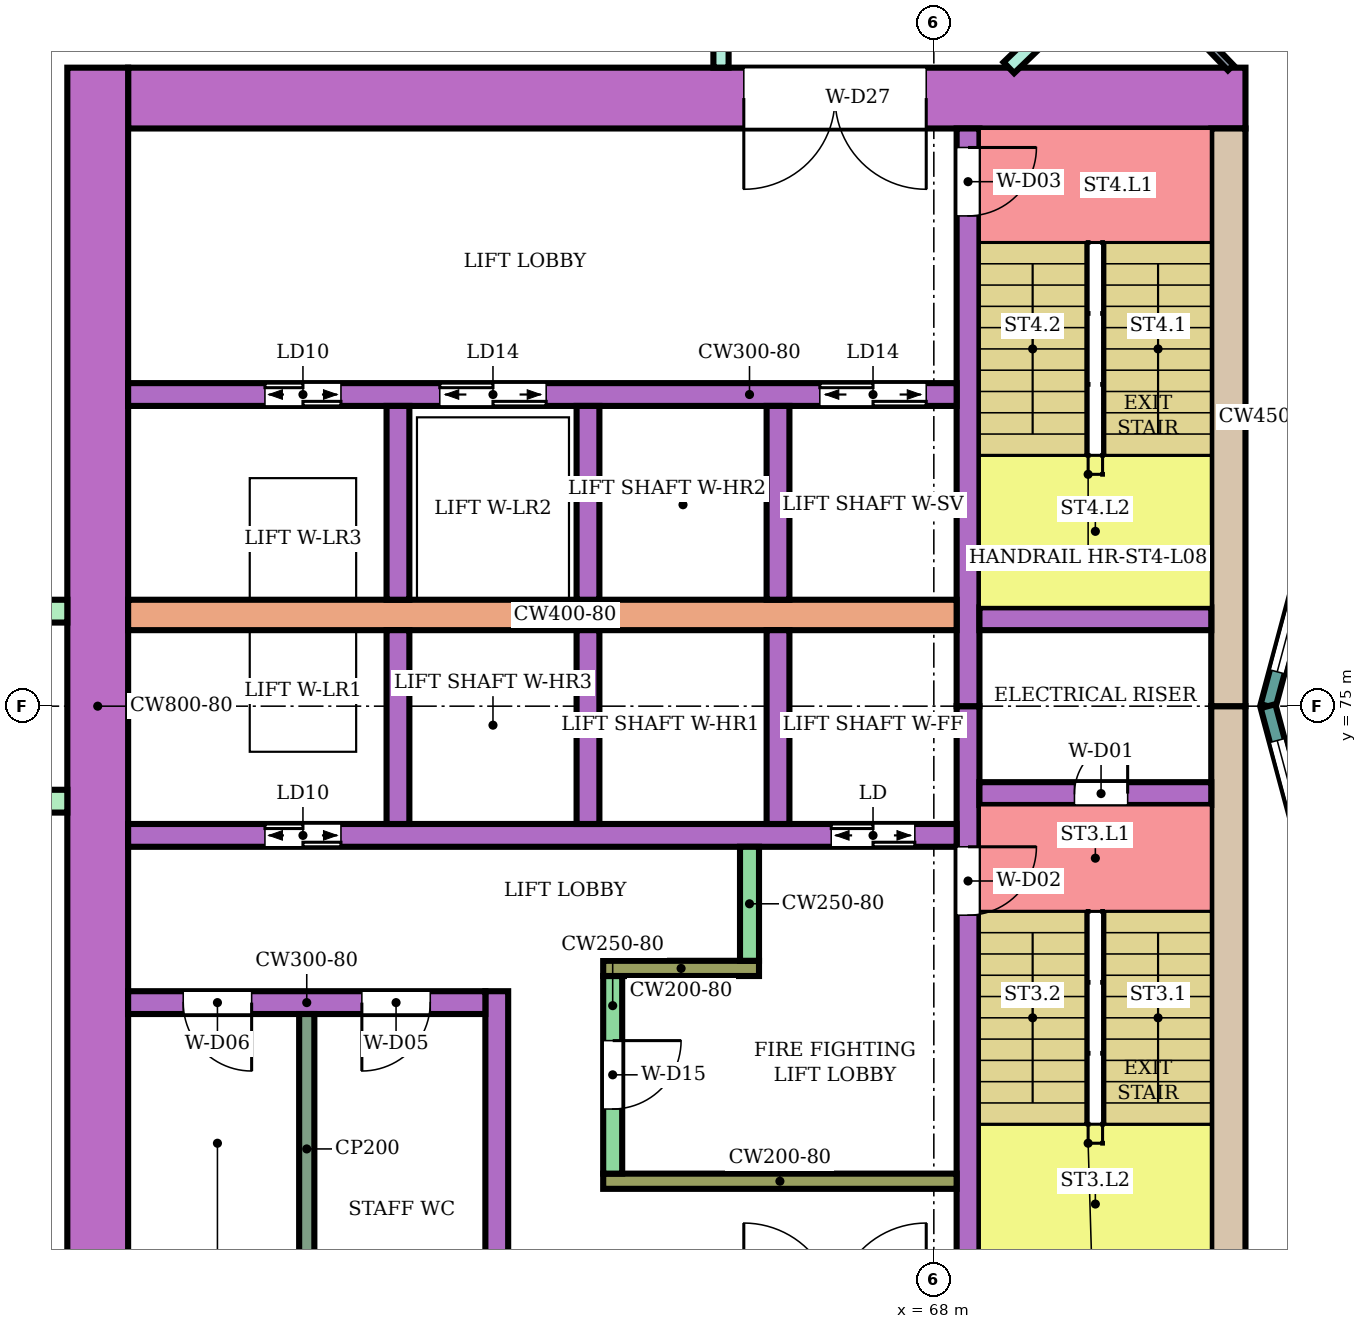
"""IFC4 building model, lengths in metres.
Left out: names, types, materials, properties, quantities, classifications, styles, units other than length and angle.
Written with IfcOpenShell. Run it as: python <this file> out.ifc"""

import sys

from ifc_helpers import new_model, si_unit, direction, frame, frame_2d, origin, place, context, subcontext, project, spatial, rectangle, extrude, element, fill, save


model = new_model("IFC4")
c1 = context("Model", 3, precision=1e-05, world=origin(), true_north=direction((0.0, 1.0)))
c2 = subcontext(c1, "Body", "Model", "MODEL_VIEW")
j1 = project(units=[si_unit("LENGTHUNIT", "METRE"), si_unit("PLANEANGLEUNIT", "RADIAN")], contexts=[c1])
p1 = place(None, origin())
s1 = spatial("IfcSite", under=j1, at=p1, CompositionType="ELEMENT")
p2 = place(p1, origin())
s2 = spatial("IfcBuilding", under=s1, at=p2, CompositionType="ELEMENT")
p3 = place(p2, frame((0.0, 0.0, 40.2)))
s3 = spatial("IfcBuildingStorey", under=s2, at=p3, CompositionType="ELEMENT", Elevation=40.2)
p4 = place(p3, frame((72.1, 83.0, 0.0), z_axis=(0.0, 0.0, 1.0), x_axis=(-1.0, 0.0, 0.0)))
e1 = element("IfcWall", 1, at=p4, inside=s3, PredefinedType="SHEAR", context=c2, shape_type="SweptSolid", body=[
    extrude(rectangle(XDim=14.7, YDim=0.8, at=frame_2d((7.35, 0.0))), origin(), (0.0, 0.0, 1.0), 3.48),
])
p5 = place(p4, frame((4.2, 0.0, 0.0)))
e2 = element("IfcOpeningElement", 2, at=p5, cuts=e1, PredefinedType="OPENING", context=c2, shape_type="SweptSolid", body=[
    extrude(rectangle(XDim=2.4, YDim=2.4, at=frame_2d((1.2, 1.2))), frame((0.0, 0.41, 0.0), z_axis=(0.0, -1.0, 0.0), x_axis=(1.0, 0.0, 0.0)), (0.0, 0.0, 1.0), 0.82),
])
for number, where, z_axis, x_axis in (
    (3, (71.875, 75.0, 0.0), (0.0, 0.0, 1.0), (0.0, -1.0, 0.0)),
    (4, (71.875, 82.6, 0.0), (0.0, 0.0, 1.0), (0.0, -1.0, 0.0)),
):
    element("IfcWall", number, at=place(p3, frame(where, z_axis=z_axis, x_axis=x_axis)), inside=s3, PredefinedType="SHEAR", context=c2, shape_type="SweptSolid", body=[
        extrude(rectangle(XDim=7.6, YDim=0.45, at=frame_2d((3.8, 0.0))), origin(), (0.0, 0.0, 1.0), 3.48),
    ])
p6 = place(p3, frame((57.0, 83.4, 0.0), z_axis=(0.0, 0.0, 1.0), x_axis=(0.0, -1.0, 0.0)))
e5 = element("IfcWall", 5, at=p6, inside=s3, PredefinedType="SHEAR", context=c2, shape_type="SweptSolid", body=[
    extrude(rectangle(XDim=16.8, YDim=0.8, at=frame_2d((8.4, 0.0))), origin(), (0.0, 0.0, 1.0), 3.48),
])
p7 = place(p3, frame((68.45, 75.0, 0.0), z_axis=(0.0, 0.0, 1.0), x_axis=(0.0, -1.0, 0.0)))
e6 = element("IfcWall", 6, at=p7, inside=s3, PredefinedType="SHEAR", context=c2, shape_type="SweptSolid", body=[
    extrude(rectangle(XDim=7.6, YDim=0.3, at=frame_2d((3.8, 0.0))), origin(), (0.0, 0.0, 1.0), 3.48),
])
p8 = place(p7, frame((1.85, 0.0, 0.0)))
e7 = element("IfcOpeningElement", 7, at=p8, cuts=e6, PredefinedType="OPENING", context=c2, shape_type="SweptSolid", body=[
    extrude(rectangle(XDim=0.9, YDim=2.1, at=frame_2d((0.45, 1.05))), frame((0.0, 0.16, 0.0), z_axis=(0.0, -1.0, 0.0), x_axis=(1.0, 0.0, 0.0)), (0.0, 0.0, 1.0), 0.32),
])
p9 = place(p3, frame((68.45, 82.6, 0.0), z_axis=(0.0, 0.0, 1.0), x_axis=(0.0, -1.0, 0.0)))
e8 = element("IfcWall", 8, at=p9, inside=s3, PredefinedType="SHEAR", context=c2, shape_type="SweptSolid", body=[
    extrude(rectangle(XDim=7.6, YDim=0.3, at=frame_2d((3.8, 0.0))), origin(), (0.0, 0.0, 1.0), 3.48),
])
p10 = place(p9, frame((0.25, 0.0, 0.0)))
e9 = element("IfcOpeningElement", 9, at=p10, cuts=e8, PredefinedType="OPENING", context=c2, shape_type="SweptSolid", body=[
    extrude(rectangle(XDim=0.9, YDim=2.1, at=frame_2d((0.45, 1.05))), frame((0.0, 0.16, 0.0), z_axis=(0.0, -1.0, 0.0), x_axis=(1.0, 0.0, 0.0)), (0.0, 0.0, 1.0), 0.32),
])
p11 = place(p3, frame((71.65, 73.85, 0.0), z_axis=(0.0, 0.0, 1.0), x_axis=(-1.0, 0.0, 0.0)))
e10 = element("IfcWall", 10, at=p11, inside=s3, PredefinedType="SHEAR", context=c2, shape_type="SweptSolid", body=[
    extrude(rectangle(XDim=3.05, YDim=0.3, at=frame_2d((1.525, 0.0))), origin(), (0.0, 0.0, 1.0), 3.48),
])
p12 = place(p11, frame((1.1, 0.0, 0.0)))
e11 = element("IfcOpeningElement", 11, at=p12, cuts=e10, PredefinedType="OPENING", context=c2, shape_type="SweptSolid", body=[
    extrude(rectangle(XDim=0.7, YDim=2.0, at=frame_2d((0.35, 1.0))), frame((0.0, 0.16, 0.0), z_axis=(0.0, -1.0, 0.0), x_axis=(1.0, 0.0, 0.0)), (0.0, 0.0, 1.0), 0.32),
])
p13 = place(p3, frame((71.65, 76.15, 0.0), z_axis=(0.0, 0.0, 1.0), x_axis=(-1.0, 0.0, 0.0)))
e12 = element("IfcWall", 12, at=p13, inside=s3, PredefinedType="SHEAR", context=c2, shape_type="SweptSolid", body=[
    extrude(rectangle(XDim=3.05, YDim=0.3, at=frame_2d((1.525, 0.0))), origin(), (0.0, 0.0, 1.0), 3.48),
])
p14 = place(p3, frame((68.3, 73.3, 0.0), z_axis=(0.0, 0.0, 1.0), x_axis=(-1.0, 0.0, 0.0)))
e13 = element("IfcWall", 13, at=p14, inside=s3, PredefinedType="SHEAR", context=c2, shape_type="SweptSolid", body=[
    extrude(rectangle(XDim=10.9, YDim=0.3, at=frame_2d((5.45, 0.0))), origin(), (0.0, 0.0, 1.0), 3.48),
])
p15 = place(p14, frame((0.55, 0.0, 0.0)))
e14 = element("IfcOpeningElement", 14, at=p15, cuts=e13, PredefinedType="OPENING", context=c2, shape_type="SweptSolid", body=[
    extrude(rectangle(XDim=1.1, YDim=2.1, at=frame_2d((0.55, 1.05))), frame((0.0, 0.16, 0.0), z_axis=(0.0, -1.0, 0.0), x_axis=(1.0, 0.0, 0.0)), (0.0, 0.0, 1.0), 0.32),
])
p16 = place(p14, frame((8.1, 0.0, 0.0)))
e15 = element("IfcOpeningElement", 15, at=p16, cuts=e13, PredefinedType="OPENING", context=c2, shape_type="SweptSolid", body=[
    extrude(rectangle(XDim=1.0, YDim=2.1, at=frame_2d((0.5, 1.05))), frame((0.0, 0.16, 0.0), z_axis=(0.0, -1.0, 0.0), x_axis=(1.0, 0.0, 0.0)), (0.0, 0.0, 1.0), 0.32),
])
p17 = place(p3, frame((68.3, 76.2, 0.0), z_axis=(0.0, 0.0, 1.0), x_axis=(-1.0, 0.0, 0.0)))
e16 = element("IfcWall", 16, at=p17, inside=s3, PredefinedType="SHEAR", context=c2, shape_type="SweptSolid", body=[
    extrude(rectangle(XDim=10.9, YDim=0.4, at=frame_2d((5.45, 0.0))), origin(), (0.0, 0.0, 1.0), 3.48),
])
p18 = place(p3, frame((68.3, 79.1, 0.0), z_axis=(0.0, 0.0, 1.0), x_axis=(-1.0, 0.0, 0.0)))
e17 = element("IfcWall", 17, at=p18, inside=s3, PredefinedType="SHEAR", context=c2, shape_type="SweptSolid", body=[
    extrude(rectangle(XDim=10.9, YDim=0.3, at=frame_2d((5.45, 0.0))), origin(), (0.0, 0.0, 1.0), 3.48),
])
p19 = place(p18, frame((0.4, 0.0, 0.0)))
e18 = element("IfcOpeningElement", 18, at=p19, cuts=e17, PredefinedType="OPENING", context=c2, shape_type="SweptSolid", body=[
    extrude(rectangle(XDim=1.4, YDim=2.1, at=frame_2d((0.7, 1.05))), frame((0.0, 0.16, 0.0), z_axis=(0.0, -1.0, 0.0), x_axis=(1.0, 0.0, 0.0)), (0.0, 0.0, 1.0), 0.32),
])
p20 = place(p18, frame((5.4, 0.0, 0.0)))
e19 = element("IfcOpeningElement", 19, at=p20, cuts=e17, PredefinedType="OPENING", context=c2, shape_type="SweptSolid", body=[
    extrude(rectangle(XDim=1.4, YDim=2.1, at=frame_2d((0.7, 1.05))), frame((0.0, 0.16, 0.0), z_axis=(0.0, -1.0, 0.0), x_axis=(1.0, 0.0, 0.0)), (0.0, 0.0, 1.0), 0.32),
])
p21 = place(p18, frame((8.1, 0.0, 0.0)))
e20 = element("IfcOpeningElement", 20, at=p21, cuts=e17, PredefinedType="OPENING", context=c2, shape_type="SweptSolid", body=[
    extrude(rectangle(XDim=1.0, YDim=2.1, at=frame_2d((0.5, 1.05))), frame((0.0, 0.16, 0.0), z_axis=(0.0, -1.0, 0.0), x_axis=(1.0, 0.0, 0.0)), (0.0, 0.0, 1.0), 0.32),
])
for number, where, z_axis, x_axis in (
    (21, (65.95, 76.0, 0.0), (0.0, 0.0, 1.0), (0.0, -1.0, 0.0)),
    (22, (63.45, 76.0, 0.0), (0.0, 0.0, 1.0), (0.0, -1.0, 0.0)),
    (23, (60.95, 76.0, 0.0), (0.0, 0.0, 1.0), (0.0, -1.0, 0.0)),
    (24, (65.95, 78.95, 0.0), (0.0, 0.0, 1.0), (0.0, -1.0, 0.0)),
    (25, (63.45, 78.95, 0.0), (0.0, 0.0, 1.0), (0.0, -1.0, 0.0)),
    (26, (60.95, 78.95, 0.0), (0.0, 0.0, 1.0), (0.0, -1.0, 0.0)),
):
    element("IfcWall", number, at=place(p3, frame(where, z_axis=z_axis, x_axis=x_axis)), inside=s3, PredefinedType="SHEAR", context=c2, shape_type="SweptSolid", body=[
        extrude(rectangle(XDim=2.55, YDim=0.3, at=frame_2d((1.275, 0.0))), origin(), (0.0, 0.0, 1.0), 3.48),
    ])
p22 = place(p3, frame((68.3, 68.75, 0.0), z_axis=(0.0, 0.0, 1.0), x_axis=(-1.0, 0.0, 0.0)))
e27 = element("IfcWall", 27, at=p22, inside=s3, PredefinedType="SHEAR", context=c2, shape_type="SweptSolid", body=[
    extrude(rectangle(XDim=4.65, YDim=0.2, at=frame_2d((2.325, 0.0))), origin(), (0.0, 0.0, 1.0), 3.48),
])
p23 = place(p3, frame((63.775, 71.45, 0.0), z_axis=(0.0, 0.0, 1.0), x_axis=(0.0, -1.0, 0.0)))
e28 = element("IfcWall", 28, at=p23, inside=s3, PredefinedType="SHEAR", context=c2, shape_type="SweptSolid", body=[
    extrude(rectangle(XDim=2.6, YDim=0.25, at=frame_2d((1.3, 0.0))), origin(), (0.0, 0.0, 1.0), 3.48),
])
p24 = place(p23, frame((0.85, 0.0, 0.0)))
e29 = element("IfcOpeningElement", 29, at=p24, cuts=e28, PredefinedType="OPENING", context=c2, shape_type="SweptSolid", body=[
    extrude(rectangle(XDim=0.9, YDim=2.1, at=frame_2d((0.45, 1.05))), frame((0.0, 0.135, 0.0), z_axis=(0.0, -1.0, 0.0), x_axis=(1.0, 0.0, 0.0)), (0.0, 0.0, 1.0), 0.27),
])
p25 = place(p3, frame((65.7, 71.55, 0.0), z_axis=(0.0, 0.0, 1.0), x_axis=(-1.0, 0.0, 0.0)))
e30 = element("IfcWall", 30, at=p25, inside=s3, PredefinedType="SHEAR", context=c2, shape_type="SweptSolid", body=[
    extrude(rectangle(XDim=2.05, YDim=0.2, at=frame_2d((1.025, 0.0))), origin(), (0.0, 0.0, 1.0), 3.48),
])
p26 = place(p3, frame((65.575, 73.15, 0.0), z_axis=(0.0, 0.0, 1.0), x_axis=(0.0, -1.0, 0.0)))
e31 = element("IfcWall", 31, at=p26, inside=s3, PredefinedType="SHEAR", context=c2, shape_type="SweptSolid", body=[
    extrude(rectangle(XDim=1.5, YDim=0.25, at=frame_2d((0.75, 0.0))), origin(), (0.0, 0.0, 1.0), 3.48),
])
p27 = place(p3, frame((62.25, 71.25, 0.0), z_axis=(0.0, 0.0, 1.0), x_axis=(0.0, -1.0, 0.0)))
e32 = element("IfcWall", 32, at=p27, inside=s3, PredefinedType="SHEAR", context=c2, shape_type="SweptSolid", body=[
    extrude(rectangle(XDim=3.85, YDim=0.3, at=frame_2d((1.925, 0.0))), origin(), (0.0, 0.0, 1.0), 3.48),
])
p28 = place(p3, frame((62.1, 71.1, 0.0), z_axis=(0.0, 0.0, 1.0), x_axis=(-1.0, 0.0, 0.0)))
e33 = element("IfcWall", 33, at=p28, inside=s3, PredefinedType="SHEAR", context=c2, shape_type="SweptSolid", body=[
    extrude(rectangle(XDim=4.7, YDim=0.3, at=frame_2d((2.35, 0.0))), origin(), (0.0, 0.0, 1.0), 3.48),
])
p29 = place(p28, frame((0.725, 0.0, 0.0)))
e34 = element("IfcOpeningElement", 34, at=p29, cuts=e33, PredefinedType="OPENING", context=c2, shape_type="SweptSolid", body=[
    extrude(rectangle(XDim=0.9, YDim=2.1, at=frame_2d((0.45, 1.05))), frame((0.0, 0.16, 0.0), z_axis=(0.0, -1.0, 0.0), x_axis=(1.0, 0.0, 0.0)), (0.0, 0.0, 1.0), 0.32),
])
p30 = place(p28, frame((3.075, 0.0, 0.0)))
e35 = element("IfcOpeningElement", 35, at=p30, cuts=e33, PredefinedType="OPENING", context=c2, shape_type="SweptSolid", body=[
    extrude(rectangle(XDim=0.9, YDim=2.1, at=frame_2d((0.45, 1.05))), frame((0.0, 0.16, 0.0), z_axis=(0.0, -1.0, 0.0), x_axis=(1.0, 0.0, 0.0)), (0.0, 0.0, 1.0), 0.32),
])
for number, where, z_axis, x_axis in (
    (36, (56.6, 76.25, 0.0), (0.0, 0.0, 1.0), (-1.0, 0.0, 0.0)),
    (37, (56.6, 73.75, 0.0), (0.0, 0.0, 1.0), (-1.0, 0.0, 0.0)),
):
    element("IfcWall", number, at=place(p3, frame(where, z_axis=z_axis, x_axis=x_axis)), inside=s3, PredefinedType="NOTDEFINED", context=c2, shape_type="SweptSolid", body=[
        extrude(rectangle(XDim=2.416, YDim=0.3, at=frame_2d((1.208, 0.0))), origin(), (0.0, 0.0, 1.0), 3.8),
    ])
p31 = place(p3, frame((73.415, 78.802, 0.0), z_axis=(0.0, 0.0, 1.0), x_axis=(-0.258789828301, -0.965933654434, 0.0)))
e38 = element("IfcWall", 38, at=p31, inside=s3, PredefinedType="NOTDEFINED", context=c2, shape_type="SweptSolid", body=[
    extrude(rectangle(XDim=3.936, YDim=0.2, at=frame_2d((1.968, 0.0))), origin(), (0.0, 0.0, 1.0), 3.8),
])
p32 = place(p31, frame((0.468, 0.0, 0.9)))
e39 = element("IfcOpeningElement", 39, at=p32, cuts=e38, PredefinedType="OPENING", context=c2, shape_type="SweptSolid", body=[
    extrude(rectangle(XDim=3.0, YDim=2.3, at=frame_2d((1.5, 1.15))), frame((0.0, 0.11, 0.0), z_axis=(0.0, -1.0, 0.0), x_axis=(1.0, 0.0, 0.0)), (0.0, 0.0, 1.0), 0.22),
])
p33 = place(p3, frame((72.396, 75.0, 0.0), z_axis=(0.0, 0.0, 1.0), x_axis=(0.258789828301, -0.965933654434, 0.0)))
e40 = element("IfcWall", 40, at=p33, inside=s3, PredefinedType="NOTDEFINED", context=c2, shape_type="SweptSolid", body=[
    extrude(rectangle(XDim=3.936, YDim=0.2, at=frame_2d((1.968, 0.0))), origin(), (0.0, 0.0, 1.0), 3.8),
])
p34 = place(p33, frame((0.468, 0.0, 0.9)))
e41 = element("IfcOpeningElement", 41, at=p34, cuts=e40, PredefinedType="OPENING", context=c2, shape_type="SweptSolid", body=[
    extrude(rectangle(XDim=3.0, YDim=2.3, at=frame_2d((1.5, 1.15))), frame((0.0, 0.11, 0.0), z_axis=(0.0, -1.0, 0.0), x_axis=(1.0, 0.0, 0.0)), (0.0, 0.0, 1.0), 0.22),
])
p35 = place(p3, frame((65.2, 83.401, 0.0), z_axis=(0.0, 0.0, 1.0), x_axis=(0.0, 1.0, 0.0)))
e42 = element("IfcWall", 42, at=p35, inside=s3, PredefinedType="PARTITIONING", context=c2, shape_type="SweptSolid", body=[
    extrude(rectangle(XDim=1.399, YDim=0.2, at=frame_2d((0.7, 0.0))), origin(), (0.0, 0.0, 1.0), 3.35),
])
p36 = place(p3, frame((68.987, 83.4, 0.0), z_axis=(0.0, 0.0, 1.0), x_axis=(0.719591503389, 0.694397629784, 0.0)))
e43 = element("IfcWall", 43, at=p36, inside=s3, PredefinedType="PARTITIONING", context=c2, shape_type="SweptSolid", body=[
    extrude(rectangle(XDim=5.378, YDim=0.2, at=frame_2d((2.689, 0.0))), origin(), (0.0, 0.0, 1.0), 3.35),
])
p37 = place(p36, frame((3.938, 0.0, 0.0)))
e44 = element("IfcOpeningElement", 44, at=p37, cuts=e43, PredefinedType="OPENING", context=c2, shape_type="SweptSolid", body=[
    extrude(rectangle(XDim=1.0, YDim=2.1, at=frame_2d((0.5, 1.05))), frame((0.0, 0.11, 0.0), z_axis=(0.0, -1.0, 0.0), x_axis=(1.0, 0.0, 0.0)), (0.0, 0.0, 1.0), 0.22),
])
p38 = place(p3, frame((70.567, 84.786, 0.0), z_axis=(0.0, 0.0, 1.0), x_axis=(0.694447472534, -0.719543402368, 0.0)))
e45 = element("IfcWall", 45, at=p38, inside=s3, PredefinedType="PARTITIONING", context=c2, shape_type="SweptSolid", body=[
    extrude(rectangle(XDim=1.926, YDim=0.1, at=frame_2d((0.963, 0.0))), origin(), (0.0, 0.0, 1.0), 3.35),
])
p39 = place(p38, frame((0.513, 0.0, 0.0)))
e46 = element("IfcOpeningElement", 46, at=p39, cuts=e45, PredefinedType="OPENING", context=c2, shape_type="SweptSolid", body=[
    extrude(rectangle(XDim=0.8, YDim=2.1, at=frame_2d((0.4, 1.05))), frame((0.0, 0.06, 0.0), z_axis=(0.0, -1.0, 0.0), x_axis=(1.0, 0.0, 0.0)), (0.0, 0.0, 1.0), 0.12),
])
p40 = place(p3, frame((59.75, 70.95, 0.0), z_axis=(0.0, 0.0, 1.0), x_axis=(0.0, -1.0, 0.0)))
e47 = element("IfcWall", 47, at=p40, inside=s3, PredefinedType="PARTITIONING", context=c2, shape_type="SweptSolid", body=[
    extrude(rectangle(XDim=3.55, YDim=0.2, at=frame_2d((1.775, 0.0))), origin(), (0.0, 0.0, 1.0), 3.48),
])
p41 = place(p32, origin())
e48 = element("IfcWindow", 48, at=p41, inside=s3, PartitioningType="SINGLE_PANEL", PredefinedType="WINDOW", context=c2, shape_type="SweptSolid", body=[
    extrude(rectangle(XDim=3.0, YDim=2.3, at=frame_2d((1.5, 1.15))), frame((0.0, 0.03, 0.0), z_axis=(0.0, -1.0, 0.0), x_axis=(1.0, 0.0, 0.0)), (0.0, 0.0, 1.0), 0.06),
])
fill(e39, e48)
p42 = place(p34, origin())
e49 = element("IfcWindow", 49, at=p42, inside=s3, PartitioningType="SINGLE_PANEL", PredefinedType="WINDOW", context=c2, shape_type="SweptSolid", body=[
    extrude(rectangle(XDim=3.0, YDim=2.3, at=frame_2d((1.5, 1.15))), frame((0.0, 0.03, 0.0), z_axis=(0.0, -1.0, 0.0), x_axis=(1.0, 0.0, 0.0)), (0.0, 0.0, 1.0), 0.06),
])
fill(e41, e49)
p43 = place(p12, frame((0.7, 0.0, 0.0), z_axis=(0.0, 0.0, 1.0), x_axis=(-1.0, 0.0, 0.0)))
e50 = element("IfcDoor", 50, at=p43, inside=s3, OperationType="SINGLE_SWING_RIGHT", PredefinedType="DOOR", context=c2, shape_type="SweptSolid", body=[
    extrude(rectangle(XDim=0.7, YDim=2.0, at=frame_2d((0.35, 1.0))), frame((0.0, 0.025, 0.0), z_axis=(0.0, -1.0, 0.0), x_axis=(1.0, 0.0, 0.0)), (0.0, 0.0, 1.0), 0.05),
])
fill(e11, e50)
p44 = place(p8, origin())
e51 = element("IfcDoor", 51, at=p44, inside=s3, OperationType="SINGLE_SWING_LEFT", PredefinedType="DOOR", context=c2, shape_type="SweptSolid", body=[
    extrude(rectangle(XDim=0.9, YDim=2.1, at=frame_2d((0.45, 1.05))), frame((0.0, 0.025, 0.0), z_axis=(0.0, -1.0, 0.0), x_axis=(1.0, 0.0, 0.0)), (0.0, 0.0, 1.0), 0.05),
])
fill(e7, e51)
p45 = place(p10, origin())
e52 = element("IfcDoor", 52, at=p45, inside=s3, OperationType="SINGLE_SWING_LEFT", PredefinedType="DOOR", context=c2, shape_type="SweptSolid", body=[
    extrude(rectangle(XDim=0.9, YDim=2.1, at=frame_2d((0.45, 1.05))), frame((0.0, 0.025, 0.0), z_axis=(0.0, -1.0, 0.0), x_axis=(1.0, 0.0, 0.0)), (0.0, 0.0, 1.0), 0.05),
])
fill(e9, e52)
p46 = place(p15, origin())
e53 = element("IfcDoor", 53, at=p46, inside=s3, OperationType="DOUBLE_DOOR_SLIDING", PredefinedType="DOOR", context=c2, shape_type="SweptSolid", body=[
    extrude(rectangle(XDim=1.1, YDim=2.1, at=frame_2d((0.55, 1.05))), frame((0.0, 0.025, 0.0), z_axis=(0.0, -1.0, 0.0), x_axis=(1.0, 0.0, 0.0)), (0.0, 0.0, 1.0), 0.05),
])
fill(e14, e53)
p47 = place(p16, origin())
e54 = element("IfcDoor", 54, at=p47, inside=s3, OperationType="DOUBLE_DOOR_SLIDING", PredefinedType="DOOR", context=c2, shape_type="SweptSolid", body=[
    extrude(rectangle(XDim=1.0, YDim=2.1, at=frame_2d((0.5, 1.05))), frame((0.0, 0.025, 0.0), z_axis=(0.0, -1.0, 0.0), x_axis=(1.0, 0.0, 0.0)), (0.0, 0.0, 1.0), 0.05),
])
fill(e15, e54)
p48 = place(p19, origin())
e55 = element("IfcDoor", 55, at=p48, inside=s3, OperationType="DOUBLE_DOOR_SLIDING", PredefinedType="DOOR", context=c2, shape_type="SweptSolid", body=[
    extrude(rectangle(XDim=1.4, YDim=2.1, at=frame_2d((0.7, 1.05))), frame((0.0, 0.025, 0.0), z_axis=(0.0, -1.0, 0.0), x_axis=(1.0, 0.0, 0.0)), (0.0, 0.0, 1.0), 0.05),
])
fill(e18, e55)
p49 = place(p20, origin())
e56 = element("IfcDoor", 56, at=p49, inside=s3, OperationType="DOUBLE_DOOR_SLIDING", PredefinedType="DOOR", context=c2, shape_type="SweptSolid", body=[
    extrude(rectangle(XDim=1.4, YDim=2.1, at=frame_2d((0.7, 1.05))), frame((0.0, 0.025, 0.0), z_axis=(0.0, -1.0, 0.0), x_axis=(1.0, 0.0, 0.0)), (0.0, 0.0, 1.0), 0.05),
])
fill(e19, e56)
p50 = place(p21, origin())
e57 = element("IfcDoor", 57, at=p50, inside=s3, OperationType="DOUBLE_DOOR_SLIDING", PredefinedType="DOOR", context=c2, shape_type="SweptSolid", body=[
    extrude(rectangle(XDim=1.0, YDim=2.1, at=frame_2d((0.5, 1.05))), frame((0.0, 0.025, 0.0), z_axis=(0.0, -1.0, 0.0), x_axis=(1.0, 0.0, 0.0)), (0.0, 0.0, 1.0), 0.05),
])
fill(e20, e57)
p51 = place(p24, origin())
e58 = element("IfcDoor", 58, at=p51, inside=s3, OperationType="SINGLE_SWING_LEFT", PredefinedType="DOOR", context=c2, shape_type="SweptSolid", body=[
    extrude(rectangle(XDim=0.9, YDim=2.1, at=frame_2d((0.45, 1.05))), frame((0.0, 0.025, 0.0), z_axis=(0.0, -1.0, 0.0), x_axis=(1.0, 0.0, 0.0)), (0.0, 0.0, 1.0), 0.05),
])
fill(e29, e58)
p52 = place(p29, origin())
e59 = element("IfcDoor", 59, at=p52, inside=s3, OperationType="SINGLE_SWING_RIGHT", PredefinedType="DOOR", context=c2, shape_type="SweptSolid", body=[
    extrude(rectangle(XDim=0.9, YDim=2.1, at=frame_2d((0.45, 1.05))), frame((0.0, 0.025, 0.0), z_axis=(0.0, -1.0, 0.0), x_axis=(1.0, 0.0, 0.0)), (0.0, 0.0, 1.0), 0.05),
])
fill(e34, e59)
p53 = place(p30, origin())
e60 = element("IfcDoor", 60, at=p53, inside=s3, OperationType="SINGLE_SWING_LEFT", PredefinedType="DOOR", context=c2, shape_type="SweptSolid", body=[
    extrude(rectangle(XDim=0.9, YDim=2.1, at=frame_2d((0.45, 1.05))), frame((0.0, 0.025, 0.0), z_axis=(0.0, -1.0, 0.0), x_axis=(1.0, 0.0, 0.0)), (0.0, 0.0, 1.0), 0.05),
])
fill(e35, e60)
p54 = place(p5, origin())
e61 = element("IfcDoor", 61, at=p54, inside=s3, OperationType="DOUBLE_DOOR_SINGLE_SWING", PredefinedType="DOOR", context=c2, shape_type="SweptSolid", body=[
    extrude(rectangle(XDim=2.4, YDim=2.4, at=frame_2d((1.2, 1.2))), frame((0.0, 0.025, 0.0), z_axis=(0.0, -1.0, 0.0), x_axis=(1.0, 0.0, 0.0)), (0.0, 0.0, 1.0), 0.05),
])
fill(e2, e61)
save(model, sys.argv[1])
